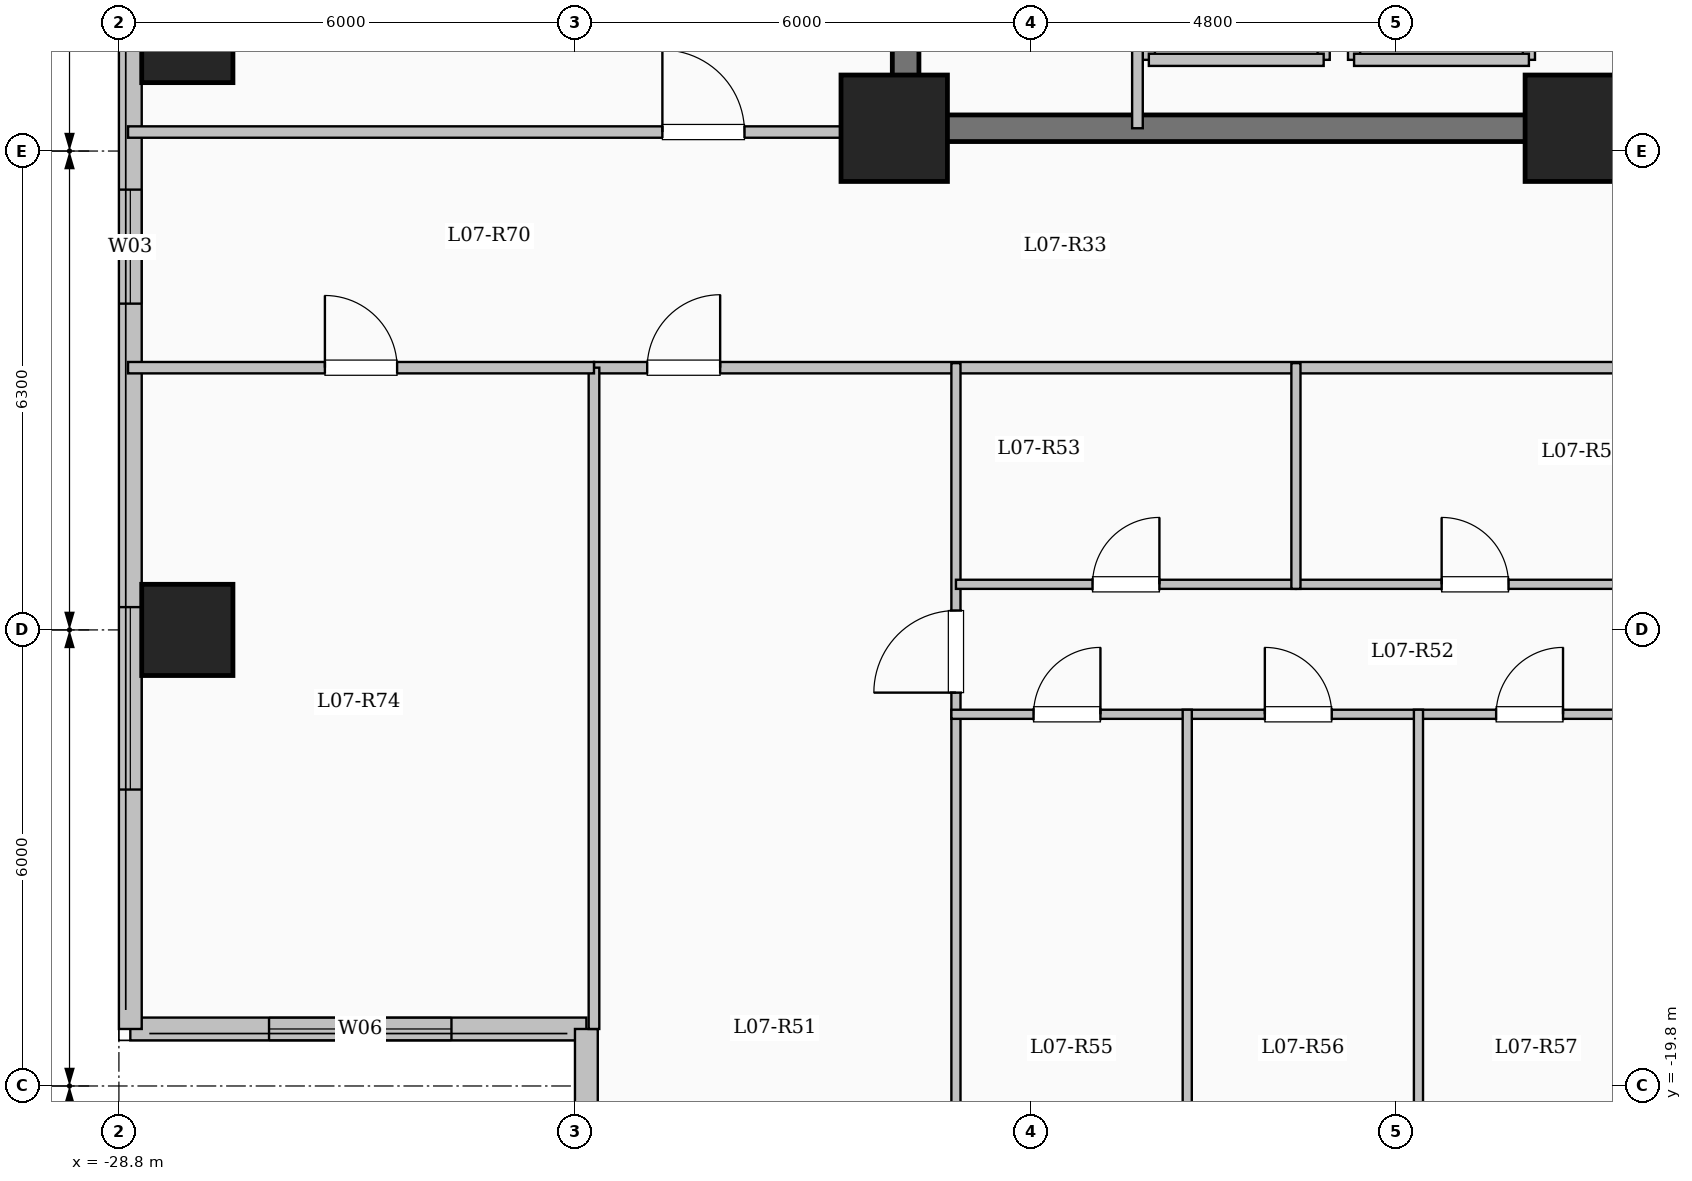
"""IFC4 building model, lengths in metres.
Left out: names, types, materials, properties, quantities, classifications, styles, units other than length and angle.
Written with IfcOpenShell. Run it as: python <this file> out.ifc"""

import sys

from ifc_helpers import new_model, si_unit, direction, frame, frame_2d, origin, origin_2d, place, context, subcontext, project, spatial, rectangle, extrude, element, fill, save


model = new_model("IFC4")
c1 = context("Model", 3, precision=1e-05, world=origin(), true_north=direction((0.0, 1.0)))
c2 = subcontext(c1, "Body", "Model", "MODEL_VIEW")
j1 = project(units=[si_unit("LENGTHUNIT", "METRE"), si_unit("PLANEANGLEUNIT", "RADIAN")], contexts=[c1])
p1 = place(None, origin())
s1 = spatial("IfcSite", under=j1, at=p1, CompositionType="ELEMENT")
p2 = place(p1, origin())
s2 = spatial("IfcBuilding", under=s1, at=p2, CompositionType="ELEMENT")
p3 = place(p2, frame((0.0, 0.0, 30.7)))
s3 = spatial("IfcBuildingStorey", under=s2, at=p3, CompositionType="ELEMENT", Elevation=30.7)
for number, where, z_axis, x_axis in (
    (1, (-9.6, -7.2, 0.0), (0.0, 0.0, 1.0), (1.0, 0.0, 0.0)),
    (2, (-18.6, -7.2, 0.0), (0.0, 0.0, 1.0), (1.0, 0.0, 0.0)),
):
    element("IfcColumn", number, at=place(p3, frame(where, z_axis=z_axis, x_axis=x_axis)), inside=s3, PredefinedType="COLUMN", context=c2, shape_type="SweptSolid", body=[
        extrude(rectangle(XDim=1.4, YDim=1.4, at=origin_2d()), origin(), (0.0, 0.0, 1.0), 3.35),
    ])
for number, where, z_axis, x_axis in (
    (3, (-27.9, -13.8, 0.0), (0.0, 0.0, 1.0), (1.0, 0.0, 0.0)),
    (4, (-27.9, -6.0, 0.0), (0.0, 0.0, 1.0), (1.0, 0.0, 0.0)),
):
    element("IfcColumn", number, at=place(p3, frame(where, z_axis=z_axis, x_axis=x_axis)), inside=s3, PredefinedType="COLUMN", context=c2, shape_type="SweptSolid", body=[
        extrude(rectangle(XDim=1.2, YDim=1.2, at=origin_2d()), origin(), (0.0, 0.0, 1.0), 3.35),
    ])
p4 = place(p3, frame((-22.65, -19.05, 0.0), z_axis=(0.0, 0.0, 1.0), x_axis=(-1.0, 0.0, 0.0)))
e5 = element("IfcWall", 5, at=p4, inside=s3, PredefinedType="SOLIDWALL", context=c2, shape_type="SweptSolid", body=[
    extrude(rectangle(XDim=6.0, YDim=0.3, at=frame_2d((3.0, 0.0))), origin(), (0.0, 0.0, 1.0), 3.1),
])
p5 = place(p4, frame((1.775, 0.0, 0.9)))
e6 = element("IfcOpeningElement", 6, at=p5, cuts=e5, PredefinedType="OPENING", context=c2, shape_type="SweptSolid", body=[
    extrude(rectangle(XDim=2.4, YDim=1.8, at=frame_2d((1.2, 0.9))), frame((0.0, 0.16, 0.0), z_axis=(0.0, -1.0, 0.0), x_axis=(1.0, 0.0, 0.0)), (0.0, 0.0, 1.0), 0.32),
])
p6 = place(p3, frame((-28.65, -19.05, 0.0), z_axis=(0.0, 0.0, 1.0), x_axis=(0.0, 1.0, 0.0)))
e7 = element("IfcWall", 7, at=p6, inside=s3, PredefinedType="SOLIDWALL", context=c2, shape_type="SweptSolid", body=[
    extrude(rectangle(XDim=38.1, YDim=0.3, at=frame_2d((19.05, 0.0))), origin(), (0.0, 0.0, 1.0), 3.1),
])
p7 = place(p6, frame((3.15, 0.0, 0.9)))
e8 = element("IfcOpeningElement", 8, at=p7, cuts=e7, PredefinedType="OPENING", context=c2, shape_type="SweptSolid", body=[
    extrude(rectangle(XDim=2.4, YDim=1.8, at=frame_2d((1.2, 0.9))), frame((0.0, 0.16, 0.0), z_axis=(0.0, -1.0, 0.0), x_axis=(1.0, 0.0, 0.0)), (0.0, 0.0, 1.0), 0.32),
])
p8 = place(p6, frame((9.542, 0.0, 0.9)))
e9 = element("IfcOpeningElement", 9, at=p8, cuts=e7, PredefinedType="OPENING", context=c2, shape_type="SweptSolid", body=[
    extrude(rectangle(XDim=1.5, YDim=1.65, at=frame_2d((0.75, 0.825))), frame((0.0, 0.16, 0.0), z_axis=(0.0, -1.0, 0.0), x_axis=(1.0, 0.0, 0.0)), (0.0, 0.0, 1.0), 0.32),
])
p9 = place(p6, frame((19.8, 0.0, 0.9)))
e10 = element("IfcOpeningElement", 10, at=p9, cuts=e7, PredefinedType="OPENING", context=c2, shape_type="SweptSolid", body=[
    extrude(rectangle(XDim=2.0, YDim=1.7, at=frame_2d((1.0, 0.85))), frame((0.0, 0.16, 0.0), z_axis=(0.0, -1.0, 0.0), x_axis=(1.0, 0.0, 0.0)), (0.0, 0.0, 1.0), 0.32),
])
p10 = place(p6, frame((30.175, 0.0, 0.95)))
e11 = element("IfcOpeningElement", 11, at=p10, cuts=e7, PredefinedType="OPENING", context=c2, shape_type="SweptSolid", body=[
    extrude(rectangle(XDim=1.0, YDim=1.5, at=frame_2d((0.5, 0.75))), frame((0.0, 0.16, 0.0), z_axis=(0.0, -1.0, 0.0), x_axis=(1.0, 0.0, 0.0)), (0.0, 0.0, 1.0), 0.32),
])
p11 = place(p6, frame((33.85, 0.0, 0.9)))
e12 = element("IfcOpeningElement", 12, at=p11, cuts=e7, PredefinedType="OPENING", context=c2, shape_type="SweptSolid", body=[
    extrude(rectangle(XDim=2.0, YDim=1.7, at=frame_2d((1.0, 0.85))), frame((0.0, 0.16, 0.0), z_axis=(0.0, -1.0, 0.0), x_axis=(1.0, 0.0, 0.0)), (0.0, 0.0, 1.0), 0.32),
])
p12 = place(p3, frame((-22.65, -23.55, 0.0), z_axis=(0.0, 0.0, 1.0), x_axis=(0.0, 1.0, 0.0)))
e13 = element("IfcWall", 13, at=p12, inside=s3, PredefinedType="SOLIDWALL", context=c2, shape_type="SweptSolid", body=[
    extrude(rectangle(XDim=4.5, YDim=0.3, at=frame_2d((2.25, 0.0))), origin(), (0.0, 0.0, 1.0), 3.1),
])
p13 = place(p12, frame((1.067, 0.0, 0.9)))
e14 = element("IfcOpeningElement", 14, at=p13, cuts=e13, PredefinedType="OPENING", context=c2, shape_type="SweptSolid", body=[
    extrude(rectangle(XDim=2.4, YDim=1.8, at=frame_2d((1.2, 0.9))), frame((0.0, 0.16, 0.0), z_axis=(0.0, -1.0, 0.0), x_axis=(1.0, 0.0, 0.0)), (0.0, 0.0, 1.0), 0.32),
])
p14 = place(p3, frame((-12.55, -6.3, 0.0), z_axis=(0.0, 0.0, 1.0), x_axis=(0.0, 1.0, 0.0)))
e15 = element("IfcWall", 15, at=p14, inside=s3, PredefinedType="SOLIDWALL", context=c2, shape_type="SweptSolid", body=[
    extrude(rectangle(XDim=2.6, YDim=0.16, at=frame_2d((1.3, 0.0))), origin(), (0.0, 0.0, 1.0), 3.1),
])
p15 = place(p3, frame((-10.25, -6.3, 0.0), z_axis=(0.0, 0.0, 1.0), x_axis=(0.0, 1.0, 0.0)))
e16 = element("IfcWall", 16, at=p15, inside=s3, PredefinedType="SOLIDWALL", context=c2, shape_type="SweptSolid", body=[
    extrude(rectangle(XDim=2.6, YDim=0.16, at=frame_2d((1.3, 0.0))), origin(), (0.0, 0.0, 1.0), 3.1),
])
p16 = place(p15, frame((0.75, 0.0, 0.0)))
e17 = element("IfcOpeningElement", 17, at=p16, cuts=e16, PredefinedType="OPENING", context=c2, shape_type="SweptSolid", body=[
    extrude(rectangle(XDim=1.1, YDim=2.15, at=frame_2d((0.55, 1.075))), frame((0.0, 0.09, 0.0), z_axis=(0.0, -1.0, 0.0), x_axis=(1.0, 0.0, 0.0)), (0.0, 0.0, 1.0), 0.18),
])
p17 = place(p3, frame((-12.55, -6.3, 0.0), z_axis=(0.0, 0.0, 1.0), x_axis=(1.0, 0.0, 0.0)))
e18 = element("IfcWall", 18, at=p17, inside=s3, PredefinedType="SOLIDWALL", context=c2, shape_type="SweptSolid", body=[
    extrude(rectangle(XDim=2.3, YDim=0.16, at=frame_2d((1.15, 0.0))), origin(), (0.0, 0.0, 1.0), 3.1),
])
for number, where, z_axis, x_axis in (
    (19, (-15.25, -6.3, 0.0), (0.0, 0.0, 1.0), (0.0, 1.0, 0.0)),
    (20, (-12.95, -6.3, 0.0), (0.0, 0.0, 1.0), (0.0, 1.0, 0.0)),
):
    element("IfcWall", number, at=place(p3, frame(where, z_axis=z_axis, x_axis=x_axis)), inside=s3, PredefinedType="SOLIDWALL", context=c2, shape_type="SweptSolid", body=[
        extrude(rectangle(XDim=2.6, YDim=0.16, at=frame_2d((1.3, 0.0))), origin(), (0.0, 0.0, 1.0), 3.1),
    ])
p18 = place(p3, frame((-15.25, -6.3, 0.0), z_axis=(0.0, 0.0, 1.0), x_axis=(1.0, 0.0, 0.0)))
e21 = element("IfcWall", 21, at=p18, inside=s3, PredefinedType="SOLIDWALL", context=c2, shape_type="SweptSolid", body=[
    extrude(rectangle(XDim=2.3, YDim=0.16, at=frame_2d((1.15, 0.0))), origin(), (0.0, 0.0, 1.0), 3.1),
])
p19 = place(p3, frame((-18.45, -7.375, 0.0), z_axis=(0.0, 0.0, 1.0), x_axis=(0.0, 1.0, 0.0)))
e22 = element("IfcWall", 22, at=p19, inside=s3, PredefinedType="SHEAR", context=c2, shape_type="SweptSolid", body=[
    extrude(rectangle(XDim=14.05, YDim=0.35, at=frame_2d((7.025, 0.0))), origin(), (0.0, 0.0, 1.0), 3.35),
])
p20 = place(p3, frame((-18.625, -7.2, 0.0), z_axis=(0.0, 0.0, 1.0), x_axis=(1.0, 0.0, 0.0)))
e23 = element("IfcWall", 23, at=p20, inside=s3, PredefinedType="SHEAR", context=c2, shape_type="SweptSolid", body=[
    extrude(rectangle(XDim=8.55, YDim=0.35, at=frame_2d((4.275, 0.0))), origin(), (0.0, 0.0, 1.0), 3.35),
])
p21 = place(p3, frame((-15.4, -7.2, 0.0), z_axis=(0.0, 0.0, 1.0), x_axis=(0.0, 1.0, 0.0)))
e24 = element("IfcWall", 24, at=p21, inside=s3, PredefinedType="PARTITIONING", context=c2, shape_type="SweptSolid", body=[
    extrude(rectangle(XDim=10.45, YDim=0.14, at=frame_2d((5.225, 0.0))), origin(), (0.0, 0.0, 1.0), 3.1),
])
p22 = place(p21, frame((9.25, 0.0, 0.0)))
e25 = element("IfcOpeningElement", 25, at=p22, cuts=e24, PredefinedType="OPENING", context=c2, shape_type="SweptSolid", body=[
    extrude(rectangle(XDim=0.9, YDim=2.08, at=frame_2d((0.45, 1.04))), frame((0.0, 0.08, 0.0), z_axis=(0.0, -1.0, 0.0), x_axis=(1.0, 0.0, 0.0)), (0.0, 0.0, 1.0), 0.16),
])
p23 = place(p3, frame((-22.55, -10.35, 0.0), z_axis=(0.0, 0.0, 1.0), x_axis=(1.0, 0.0, 0.0)))
e26 = element("IfcWall", 26, at=p23, inside=s3, PredefinedType="PARTITIONING", context=c2, shape_type="SweptSolid", body=[
    extrude(rectangle(XDim=14.0, YDim=0.15, at=frame_2d((7.0, 0.0))), origin(), (0.0, 0.0, 1.0), 3.1),
])
p24 = place(p23, frame((0.7, 0.0, 0.0)))
e27 = element("IfcOpeningElement", 27, at=p24, cuts=e26, PredefinedType="OPENING", context=c2, shape_type="SweptSolid", body=[
    extrude(rectangle(XDim=0.96, YDim=2.15, at=frame_2d((0.48, 1.075))), frame((0.0, 0.085, 0.0), z_axis=(0.0, -1.0, 0.0), x_axis=(1.0, 0.0, 0.0)), (0.0, 0.0, 1.0), 0.17),
])
p25 = place(p3, frame((-17.788, -23.6, 0.0), z_axis=(0.0, 0.0, 1.0), x_axis=(0.0, 1.0, 0.0)))
e28 = element("IfcWall", 28, at=p25, inside=s3, PredefinedType="PARTITIONING", context=c2, shape_type="SweptSolid", body=[
    extrude(rectangle(XDim=13.31, YDim=0.12, at=frame_2d((6.655, 0.0))), origin(), (0.0, 0.0, 1.0), 3.1),
])
p26 = place(p25, frame((8.975, 0.0, 0.0)))
e29 = element("IfcOpeningElement", 29, at=p26, cuts=e28, PredefinedType="OPENING", context=c2, shape_type="SweptSolid", body=[
    extrude(rectangle(XDim=1.08, YDim=2.15, at=frame_2d((0.54, 1.075))), frame((0.0, 0.07, 0.0), z_axis=(0.0, -1.0, 0.0), x_axis=(1.0, 0.0, 0.0)), (0.0, 0.0, 1.0), 0.14),
])
p27 = place(p3, frame((-17.788, -13.2, 0.0), z_axis=(0.0, 0.0, 1.0), x_axis=(1.0, 0.0, 0.0)))
e30 = element("IfcWall", 30, at=p27, inside=s3, PredefinedType="PARTITIONING", context=c2, shape_type="SweptSolid", body=[
    extrude(rectangle(XDim=4.473, YDim=0.12, at=frame_2d((2.237, 0.0))), origin(), (0.0, 0.0, 1.0), 3.1),
])
p28 = place(p27, frame((1.797, 0.0, 0.0)))
e31 = element("IfcOpeningElement", 31, at=p28, cuts=e30, PredefinedType="OPENING", context=c2, shape_type="SweptSolid", body=[
    extrude(rectangle(XDim=0.88, YDim=2.1, at=frame_2d((0.44, 1.05))), frame((0.0, 0.07, 0.0), z_axis=(0.0, -1.0, 0.0), x_axis=(1.0, 0.0, 0.0)), (0.0, 0.0, 1.0), 0.14),
])
p29 = place(p3, frame((-13.315, -13.2, 0.0), z_axis=(0.0, 0.0, 1.0), x_axis=(1.0, 0.0, 0.0)))
e32 = element("IfcWall", 32, at=p29, inside=s3, PredefinedType="PARTITIONING", context=c2, shape_type="SweptSolid", body=[
    extrude(rectangle(XDim=4.715, YDim=0.12, at=frame_2d((2.357, 0.0))), origin(), (0.0, 0.0, 1.0), 3.1),
])
p30 = place(p29, frame((1.917, 0.0, 0.0)))
e33 = element("IfcOpeningElement", 33, at=p30, cuts=e32, PredefinedType="OPENING", context=c2, shape_type="SweptSolid", body=[
    extrude(rectangle(XDim=0.88, YDim=2.1, at=frame_2d((0.44, 1.05))), frame((0.0, 0.07, 0.0), z_axis=(0.0, -1.0, 0.0), x_axis=(1.0, 0.0, 0.0)), (0.0, 0.0, 1.0), 0.14),
])
p31 = place(p3, frame((-17.848, -14.91, 0.0), z_axis=(0.0, 0.0, 1.0), x_axis=(1.0, 0.0, 0.0)))
e34 = element("IfcWall", 34, at=p31, inside=s3, PredefinedType="PARTITIONING", context=c2, shape_type="SweptSolid", body=[
    extrude(rectangle(XDim=9.308, YDim=0.12, at=frame_2d((4.654, 0.0))), origin(), (0.0, 0.0, 1.0), 2.585),
])
p32 = place(p31, frame((1.081, 0.0, 0.0)))
e35 = element("IfcOpeningElement", 35, at=p32, cuts=e34, PredefinedType="OPENING", context=c2, shape_type="SweptSolid", body=[
    extrude(rectangle(XDim=0.88, YDim=2.1, at=frame_2d((0.44, 1.05))), frame((0.0, 0.07, 0.0), z_axis=(0.0, -1.0, 0.0), x_axis=(1.0, 0.0, 0.0)), (0.0, 0.0, 1.0), 0.14),
])
p33 = place(p31, frame((4.124, 0.0, 0.0)))
e36 = element("IfcOpeningElement", 36, at=p33, cuts=e34, PredefinedType="OPENING", context=c2, shape_type="SweptSolid", body=[
    extrude(rectangle(XDim=0.88, YDim=2.1, at=frame_2d((0.44, 1.05))), frame((0.0, 0.07, 0.0), z_axis=(0.0, -1.0, 0.0), x_axis=(1.0, 0.0, 0.0)), (0.0, 0.0, 1.0), 0.14),
])
p34 = place(p31, frame((7.167, 0.0, 0.0)))
e37 = element("IfcOpeningElement", 37, at=p34, cuts=e34, PredefinedType="OPENING", context=c2, shape_type="SweptSolid", body=[
    extrude(rectangle(XDim=0.88, YDim=2.1, at=frame_2d((0.44, 1.05))), frame((0.0, 0.07, 0.0), z_axis=(0.0, -1.0, 0.0), x_axis=(1.0, 0.0, 0.0)), (0.0, 0.0, 1.0), 0.14),
])
p35 = place(p3, frame((-13.315, -13.26, 0.0), z_axis=(0.0, 0.0, 1.0), x_axis=(0.0, 1.0, 0.0)))
e38 = element("IfcWall", 38, at=p35, inside=s3, PredefinedType="PARTITIONING", context=c2, shape_type="SweptSolid", body=[
    extrude(rectangle(XDim=2.97, YDim=0.12, at=frame_2d((1.485, 0.0))), origin(), (0.0, 0.0, 1.0), 3.1),
])
p36 = place(p3, frame((-14.745, -23.6, 0.0), z_axis=(0.0, 0.0, 1.0), x_axis=(0.0, 1.0, 0.0)))
e39 = element("IfcWall", 39, at=p36, inside=s3, PredefinedType="PARTITIONING", context=c2, shape_type="SweptSolid", body=[
    extrude(rectangle(XDim=8.75, YDim=0.12, at=frame_2d((4.375, 0.0))), origin(), (0.0, 0.0, 1.0), 2.435),
])
p37 = place(p3, frame((-11.703, -23.6, 0.0), z_axis=(0.0, 0.0, 1.0), x_axis=(0.0, 1.0, 0.0)))
e40 = element("IfcWall", 40, at=p37, inside=s3, PredefinedType="PARTITIONING", context=c2, shape_type="SweptSolid", body=[
    extrude(rectangle(XDim=8.75, YDim=0.12, at=frame_2d((4.375, 0.0))), origin(), (0.0, 0.0, 1.0), 3.1),
])
p38 = place(p3, frame((-28.68, -7.25, 0.0), z_axis=(0.0, 0.0, 1.0), x_axis=(1.0, 0.0, 0.0)))
e41 = element("IfcWall", 41, at=p38, inside=s3, PredefinedType="PARTITIONING", context=c2, shape_type="SweptSolid", body=[
    extrude(rectangle(XDim=10.23, YDim=0.15, at=frame_2d((5.115, 0.0))), origin(), (0.0, 0.0, 1.0), 3.1),
])
p39 = place(p38, frame((7.03, 0.0, 0.0)))
e42 = element("IfcOpeningElement", 42, at=p39, cuts=e41, PredefinedType="OPENING", context=c2, shape_type="SweptSolid", body=[
    extrude(rectangle(XDim=1.08, YDim=2.15, at=frame_2d((0.54, 1.075))), frame((0.0, 0.085, 0.0), z_axis=(0.0, -1.0, 0.0), x_axis=(1.0, 0.0, 0.0)), (0.0, 0.0, 1.0), 0.17),
])
p40 = place(p3, frame((-22.55, -19.05, 0.0), z_axis=(0.0, 0.0, 1.0), x_axis=(0.0, 1.0, 0.0)))
e43 = element("IfcWall", 43, at=p40, inside=s3, PredefinedType="PARTITIONING", context=c2, shape_type="SweptSolid", body=[
    extrude(rectangle(XDim=8.7, YDim=0.14, at=frame_2d((4.35, 0.0))), origin(), (0.0, 0.0, 1.0), 3.1),
])
p41 = place(p3, frame((-28.68, -10.35, 0.0), z_axis=(0.0, 0.0, 1.0), x_axis=(1.0, 0.0, 0.0)))
e44 = element("IfcWall", 44, at=p41, inside=s3, PredefinedType="PARTITIONING", context=c2, shape_type="SweptSolid", body=[
    extrude(rectangle(XDim=6.13, YDim=0.15, at=frame_2d((3.065, 0.0))), origin(), (0.0, 0.0, 1.0), 3.1),
])
p42 = place(p41, frame((2.59, 0.0, 0.0)))
e45 = element("IfcOpeningElement", 45, at=p42, cuts=e44, PredefinedType="OPENING", context=c2, shape_type="SweptSolid", body=[
    extrude(rectangle(XDim=0.95, YDim=2.15, at=frame_2d((0.475, 1.075))), frame((0.0, 0.085, 0.0), z_axis=(0.0, -1.0, 0.0), x_axis=(1.0, 0.0, 0.0)), (0.0, 0.0, 1.0), 0.17),
])
p43 = place(p5, origin())
e46 = element("IfcWindow", 46, at=p43, inside=s3, PartitioningType="SINGLE_PANEL", PredefinedType="WINDOW", context=c2, shape_type="SweptSolid", body=[
    extrude(rectangle(XDim=2.4, YDim=1.8, at=frame_2d((1.2, 0.9))), frame((0.0, 0.03, 0.0), z_axis=(0.0, -1.0, 0.0), x_axis=(1.0, 0.0, 0.0)), (0.0, 0.0, 1.0), 0.06),
])
fill(e6, e46)
p44 = place(p7, origin())
e47 = element("IfcWindow", 47, at=p44, inside=s3, PartitioningType="SINGLE_PANEL", PredefinedType="WINDOW", context=c2, shape_type="SweptSolid", body=[
    extrude(rectangle(XDim=2.4, YDim=1.8, at=frame_2d((1.2, 0.9))), frame((0.0, 0.03, 0.0), z_axis=(0.0, -1.0, 0.0), x_axis=(1.0, 0.0, 0.0)), (0.0, 0.0, 1.0), 0.06),
])
fill(e8, e47)
p45 = place(p8, origin())
e48 = element("IfcWindow", 48, at=p45, inside=s3, PartitioningType="SINGLE_PANEL", PredefinedType="WINDOW", context=c2, shape_type="SweptSolid", body=[
    extrude(rectangle(XDim=1.5, YDim=1.65, at=frame_2d((0.75, 0.825))), frame((0.0, 0.03, 0.0), z_axis=(0.0, -1.0, 0.0), x_axis=(1.0, 0.0, 0.0)), (0.0, 0.0, 1.0), 0.06),
])
fill(e9, e48)
p46 = place(p24, origin())
e49 = element("IfcDoor", 49, at=p46, inside=s3, OperationType="SINGLE_SWING_RIGHT", PredefinedType="DOOR", context=c2, shape_type="SweptSolid", body=[
    extrude(rectangle(XDim=0.96, YDim=2.15, at=frame_2d((0.48, 1.075))), frame((0.0, 0.025, 0.0), z_axis=(0.0, -1.0, 0.0), x_axis=(1.0, 0.0, 0.0)), (0.0, 0.0, 1.0), 0.05),
])
fill(e27, e49)
p47 = place(p26, origin())
e50 = element("IfcDoor", 50, at=p47, inside=s3, OperationType="SINGLE_SWING_LEFT", PredefinedType="DOOR", context=c2, shape_type="SweptSolid", body=[
    extrude(rectangle(XDim=1.08, YDim=2.15, at=frame_2d((0.54, 1.075))), frame((0.0, 0.025, 0.0), z_axis=(0.0, -1.0, 0.0), x_axis=(1.0, 0.0, 0.0)), (0.0, 0.0, 1.0), 0.05),
])
fill(e29, e50)
p48 = place(p28, origin())
e51 = element("IfcDoor", 51, at=p48, inside=s3, OperationType="SINGLE_SWING_RIGHT", PredefinedType="DOOR", context=c2, shape_type="SweptSolid", body=[
    extrude(rectangle(XDim=0.88, YDim=2.1, at=frame_2d((0.44, 1.05))), frame((0.0, 0.025, 0.0), z_axis=(0.0, -1.0, 0.0), x_axis=(1.0, 0.0, 0.0)), (0.0, 0.0, 1.0), 0.05),
])
fill(e31, e51)
p49 = place(p30, origin())
e52 = element("IfcDoor", 52, at=p49, inside=s3, OperationType="SINGLE_SWING_LEFT", PredefinedType="DOOR", context=c2, shape_type="SweptSolid", body=[
    extrude(rectangle(XDim=0.88, YDim=2.1, at=frame_2d((0.44, 1.05))), frame((0.0, 0.025, 0.0), z_axis=(0.0, -1.0, 0.0), x_axis=(1.0, 0.0, 0.0)), (0.0, 0.0, 1.0), 0.05),
])
fill(e33, e52)
p50 = place(p32, origin())
e53 = element("IfcDoor", 53, at=p50, inside=s3, OperationType="SINGLE_SWING_RIGHT", PredefinedType="DOOR", context=c2, shape_type="SweptSolid", body=[
    extrude(rectangle(XDim=0.88, YDim=2.1, at=frame_2d((0.44, 1.05))), frame((0.0, 0.025, 0.0), z_axis=(0.0, -1.0, 0.0), x_axis=(1.0, 0.0, 0.0)), (0.0, 0.0, 1.0), 0.05),
])
fill(e35, e53)
p51 = place(p33, origin())
e54 = element("IfcDoor", 54, at=p51, inside=s3, OperationType="SINGLE_SWING_LEFT", PredefinedType="DOOR", context=c2, shape_type="SweptSolid", body=[
    extrude(rectangle(XDim=0.88, YDim=2.1, at=frame_2d((0.44, 1.05))), frame((0.0, 0.025, 0.0), z_axis=(0.0, -1.0, 0.0), x_axis=(1.0, 0.0, 0.0)), (0.0, 0.0, 1.0), 0.05),
])
fill(e36, e54)
p52 = place(p34, origin())
e55 = element("IfcDoor", 55, at=p52, inside=s3, OperationType="SINGLE_SWING_RIGHT", PredefinedType="DOOR", context=c2, shape_type="SweptSolid", body=[
    extrude(rectangle(XDim=0.88, YDim=2.1, at=frame_2d((0.44, 1.05))), frame((0.0, 0.025, 0.0), z_axis=(0.0, -1.0, 0.0), x_axis=(1.0, 0.0, 0.0)), (0.0, 0.0, 1.0), 0.05),
])
fill(e37, e55)
p53 = place(p42, origin())
e56 = element("IfcDoor", 56, at=p53, inside=s3, OperationType="SINGLE_SWING_LEFT", PredefinedType="DOOR", context=c2, shape_type="SweptSolid", body=[
    extrude(rectangle(XDim=0.95, YDim=2.15, at=frame_2d((0.475, 1.075))), frame((0.0, 0.025, 0.0), z_axis=(0.0, -1.0, 0.0), x_axis=(1.0, 0.0, 0.0)), (0.0, 0.0, 1.0), 0.05),
])
fill(e45, e56)
p54 = place(p39, origin())
e57 = element("IfcDoor", 57, at=p54, inside=s3, OperationType="SINGLE_SWING_LEFT", PredefinedType="DOOR", context=c2, shape_type="SweptSolid", body=[
    extrude(rectangle(XDim=1.08, YDim=2.15, at=frame_2d((0.54, 1.075))), frame((0.0, 0.025, 0.0), z_axis=(0.0, -1.0, 0.0), x_axis=(1.0, 0.0, 0.0)), (0.0, 0.0, 1.0), 0.05),
])
fill(e42, e57)
save(model, sys.argv[1])
